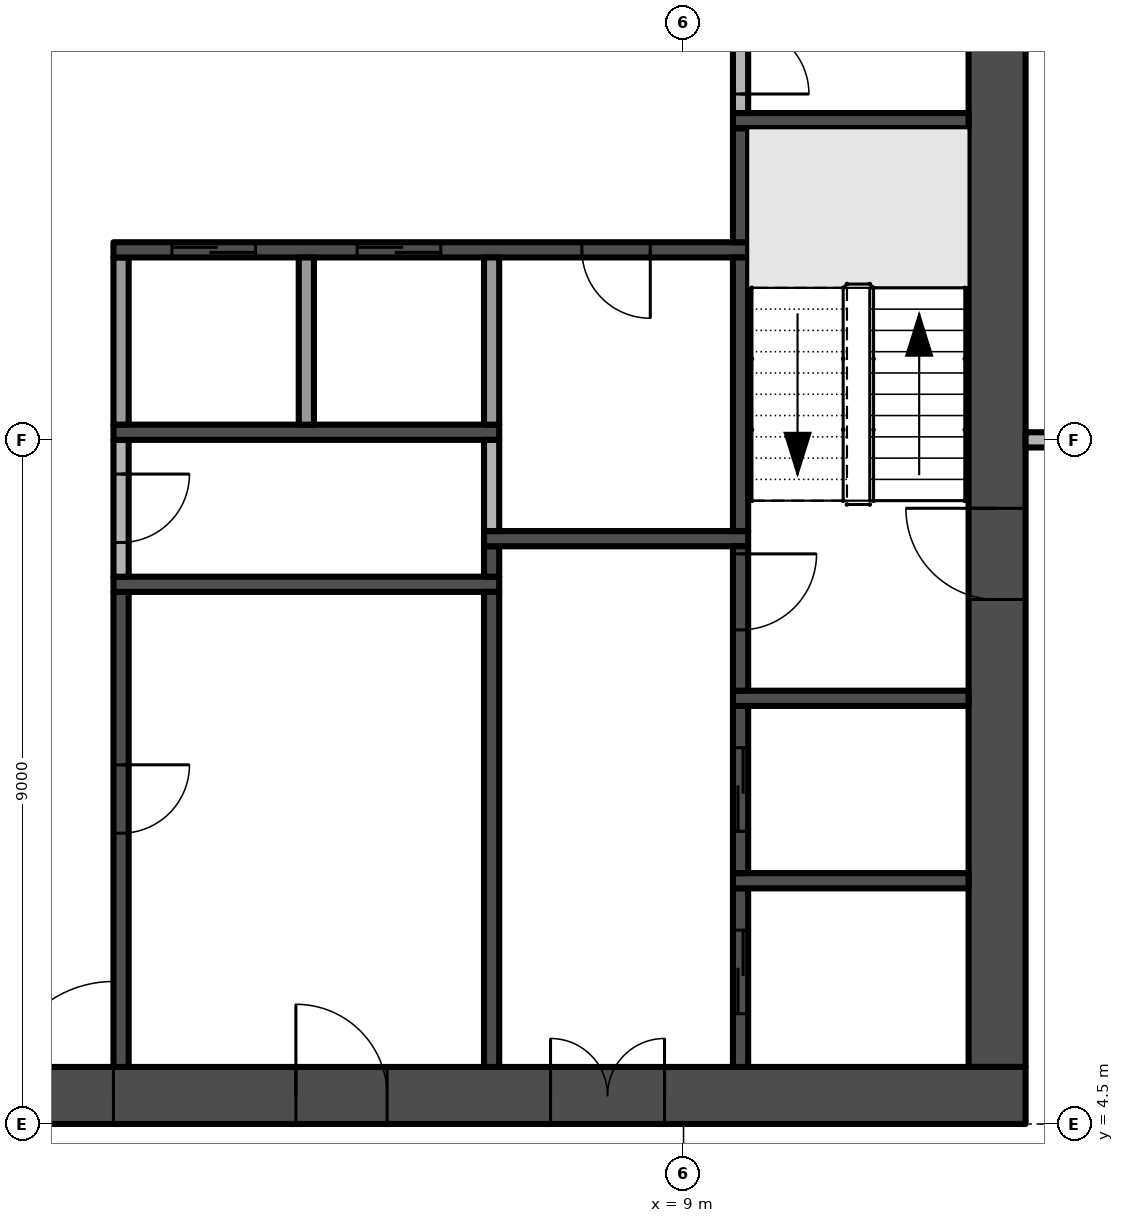
"""IFC4 building model, lengths in metres.
Left out: names, types, materials, properties, quantities, classifications, styles, units other than length and angle.
Written with IfcOpenShell. Run it as: python <this file> out.ifc"""

import sys

from ifc_helpers import new_model, si_unit, direction, frame, frame_2d, origin, place, context, subcontext, project, spatial, rectangle, extrude, element, fill, save


model = new_model("IFC4")
c1 = context("Model", 3, precision=1e-05, world=origin(), true_north=direction((0.0, 1.0)))
c2 = subcontext(c1, "Body", "Model", "MODEL_VIEW")
j1 = project(units=[si_unit("LENGTHUNIT", "METRE"), si_unit("PLANEANGLEUNIT", "RADIAN")], contexts=[c1])
p1 = place(None, origin())
s1 = spatial("IfcSite", under=j1, at=p1, CompositionType="ELEMENT")
p2 = place(p1, origin())
s2 = spatial("IfcBuilding", under=s1, at=p2, CompositionType="ELEMENT")
p3 = place(p2, frame((0.0, 0.0, 125.0)))
s3 = spatial("IfcBuildingStorey", under=s2, at=p3, CompositionType="ELEMENT", Elevation=125.0)
p4 = place(p3, frame((-13.5, 4.875, -0.3), z_axis=(0.0, 0.0, 1.0), x_axis=(1.0, 0.0, 0.0)))
e1 = element("IfcWall", 1, at=p4, inside=s3, PredefinedType="SHEAR", context=c2, shape_type="SweptSolid", body=[
    extrude(rectangle(XDim=27.0, YDim=0.75, at=frame_2d((13.5, 0.0))), origin(), (0.0, 0.0, 1.0), 3.8),
])
p5 = place(p4, frame((12.0, 0.0, 0.3)))
e2 = element("IfcOpeningElement", 2, at=p5, cuts=e1, PredefinedType="OPENING", context=c2, shape_type="SweptSolid", body=[
    extrude(rectangle(XDim=3.0, YDim=2.4, at=frame_2d((1.5, 1.2))), frame((0.0, 0.385, 0.0), z_axis=(0.0, -1.0, 0.0), x_axis=(1.0, 0.0, 0.0)), (0.0, 0.0, 1.0), 0.77),
])
p6 = place(p4, frame((4.9, 0.0, 0.3)))
e3 = element("IfcOpeningElement", 3, at=p6, cuts=e1, PredefinedType="OPENING", context=c2, shape_type="SweptSolid", body=[
    extrude(rectangle(XDim=1.2, YDim=2.2, at=frame_2d((0.6, 1.1))), frame((0.0, 0.385, 0.0), z_axis=(0.0, -1.0, 0.0), x_axis=(1.0, 0.0, 0.0)), (0.0, 0.0, 1.0), 0.77),
])
p7 = place(p4, frame((20.75, 0.0, 0.3)))
e4 = element("IfcOpeningElement", 4, at=p7, cuts=e1, PredefinedType="OPENING", context=c2, shape_type="SweptSolid", body=[
    extrude(rectangle(XDim=1.5, YDim=2.2, at=frame_2d((0.75, 1.1))), frame((0.0, 0.385, 0.0), z_axis=(0.0, -1.0, 0.0), x_axis=(1.0, 0.0, 0.0)), (0.0, 0.0, 1.0), 0.77),
])
p8 = place(p4, frame((17.4, 0.0, 0.3)))
e5 = element("IfcOpeningElement", 5, at=p8, cuts=e1, PredefinedType="OPENING", context=c2, shape_type="SweptSolid", body=[
    extrude(rectangle(XDim=1.2, YDim=2.2, at=frame_2d((0.6, 1.1))), frame((0.0, 0.385, 0.0), z_axis=(0.0, -1.0, 0.0), x_axis=(1.0, 0.0, 0.0)), (0.0, 0.0, 1.0), 0.77),
])
p9 = place(p3, frame((13.125, 5.25, -0.3), z_axis=(0.0, 0.0, 1.0), x_axis=(0.0, 1.0, 0.0)))
e6 = element("IfcWall", 6, at=p9, inside=s3, PredefinedType="SHEAR", context=c2, shape_type="SweptSolid", body=[
    extrude(rectangle(XDim=16.5, YDim=0.75, at=frame_2d((8.25, 0.0))), origin(), (0.0, 0.0, 1.0), 3.8),
])
p10 = place(p9, frame((6.15, 0.0, 0.3)))
e7 = element("IfcOpeningElement", 7, at=p10, cuts=e6, PredefinedType="OPENING", context=c2, shape_type="SweptSolid", body=[
    extrude(rectangle(XDim=1.2, YDim=2.2, at=frame_2d((0.6, 1.1))), frame((0.0, 0.385, 0.0), z_axis=(0.0, -1.0, 0.0), x_axis=(1.0, 0.0, 0.0)), (0.0, 0.0, 1.0), 0.77),
])
p11 = place(p3, frame((1.6, 11.5, 0.0), z_axis=(0.0, 0.0, 1.0), x_axis=(0.0, -1.0, 0.0)))
e8 = element("IfcWall", 8, at=p11, inside=s3, PredefinedType="SHEAR", context=c2, shape_type="SweptSolid", body=[
    extrude(rectangle(XDim=6.25, YDim=0.2, at=frame_2d((3.125, 0.0))), origin(), (0.0, 0.0, 1.0), 3.5),
])
p12 = place(p11, frame((2.275, 0.0, 0.0)))
e9 = element("IfcOpeningElement", 9, at=p12, cuts=e8, PredefinedType="OPENING", context=c2, shape_type="SweptSolid", body=[
    extrude(rectangle(XDim=0.9, YDim=2.1, at=frame_2d((0.45, 1.05))), frame((0.0, 0.11, 0.0), z_axis=(0.0, -1.0, 0.0), x_axis=(1.0, 0.0, 0.0)), (0.0, 0.0, 1.0), 0.22),
])
p13 = place(p3, frame((1.5, 11.6, 0.0), z_axis=(0.0, 0.0, 1.0), x_axis=(1.0, 0.0, 0.0)))
e10 = element("IfcWall", 10, at=p13, inside=s3, PredefinedType="SHEAR", context=c2, shape_type="SweptSolid", body=[
    extrude(rectangle(XDim=5.075, YDim=0.2, at=frame_2d((2.538, 0.0))), origin(), (0.0, 0.0, 1.0), 3.5),
])
p14 = place(p3, frame((1.6, 13.5, 0.0), z_axis=(0.0, 0.0, 1.0), x_axis=(0.0, -1.0, 0.0)))
e11 = element("IfcWall", 11, at=p14, inside=s3, PredefinedType="PARTITIONING", context=c2, shape_type="SweptSolid", body=[
    extrude(rectangle(XDim=1.8, YDim=0.2, at=frame_2d((0.9, 0.0))), origin(), (0.0, 0.0, 1.0), 3.5),
])
p15 = place(p14, frame((0.45, 0.0, 0.0)))
e12 = element("IfcOpeningElement", 12, at=p15, cuts=e11, PredefinedType="OPENING", context=c2, shape_type="SweptSolid", body=[
    extrude(rectangle(XDim=0.9, YDim=2.1, at=frame_2d((0.45, 1.05))), frame((0.0, 0.11, 0.0), z_axis=(0.0, -1.0, 0.0), x_axis=(1.0, 0.0, 0.0)), (0.0, 0.0, 1.0), 0.22),
])
p16 = place(p3, frame((1.5, 13.6, 0.0), z_axis=(0.0, 0.0, 1.0), x_axis=(1.0, 0.0, 0.0)))
e13 = element("IfcWall", 13, at=p16, inside=s3, PredefinedType="SHEAR", context=c2, shape_type="SweptSolid", body=[
    extrude(rectangle(XDim=5.075, YDim=0.2, at=frame_2d((2.538, 0.0))), origin(), (0.0, 0.0, 1.0), 3.5),
])
p17 = place(p3, frame((1.6, 13.7, 0.0), z_axis=(0.0, 0.0, 1.0), x_axis=(0.0, 1.0, 0.0)))
e14 = element("IfcWall", 14, at=p17, inside=s3, PredefinedType="PARTITIONING", context=c2, shape_type="SweptSolid", body=[
    extrude(rectangle(XDim=2.2, YDim=0.2, at=frame_2d((1.1, 0.0))), origin(), (0.0, 0.0, 1.0), 3.5),
])
p18 = place(p3, frame((9.85, 16.0, 0.0), z_axis=(0.0, 0.0, 1.0), x_axis=(-1.0, 0.0, 0.0)))
e15 = element("IfcWall", 15, at=p18, inside=s3, PredefinedType="SHEAR", context=c2, shape_type="SweptSolid", body=[
    extrude(rectangle(XDim=8.35, YDim=0.2, at=frame_2d((4.175, 0.0))), origin(), (0.0, 0.0, 1.0), 3.5),
])
p19 = place(p18, frame((6.481, 0.0, 0.0)))
e16 = element("IfcOpeningElement", 16, at=p19, cuts=e15, PredefinedType="OPENING", context=c2, shape_type="SweptSolid", body=[
    extrude(rectangle(XDim=1.1, YDim=2.1, at=frame_2d((0.55, 1.05))), frame((0.0, 0.11, 0.0), z_axis=(0.0, -1.0, 0.0), x_axis=(1.0, 0.0, 0.0)), (0.0, 0.0, 1.0), 0.22),
])
p20 = place(p18, frame((4.044, 0.0, 0.0)))
e17 = element("IfcOpeningElement", 17, at=p20, cuts=e15, PredefinedType="OPENING", context=c2, shape_type="SweptSolid", body=[
    extrude(rectangle(XDim=1.1, YDim=2.1, at=frame_2d((0.55, 1.05))), frame((0.0, 0.11, 0.0), z_axis=(0.0, -1.0, 0.0), x_axis=(1.0, 0.0, 0.0)), (0.0, 0.0, 1.0), 0.22),
])
p21 = place(p18, frame((1.288, 0.0, 0.0)))
e18 = element("IfcOpeningElement", 18, at=p21, cuts=e15, PredefinedType="OPENING", context=c2, shape_type="SweptSolid", body=[
    extrude(rectangle(XDim=0.9, YDim=2.1, at=frame_2d((0.45, 1.05))), frame((0.0, 0.11, 0.0), z_axis=(0.0, -1.0, 0.0), x_axis=(1.0, 0.0, 0.0)), (0.0, 0.0, 1.0), 0.22),
])
p22 = place(p3, frame((4.037, 13.7, 0.0), z_axis=(0.0, 0.0, 1.0), x_axis=(0.0, 1.0, 0.0)))
e19 = element("IfcWall", 19, at=p22, inside=s3, PredefinedType="PARTITIONING", context=c2, shape_type="SweptSolid", body=[
    extrude(rectangle(XDim=2.2, YDim=0.2, at=frame_2d((1.1, 0.0))), origin(), (0.0, 0.0, 1.0), 3.5),
])
p23 = place(p3, frame((6.475, 5.25, 0.0), z_axis=(0.0, 0.0, 1.0), x_axis=(0.0, 1.0, 0.0)))
e20 = element("IfcWall", 20, at=p23, inside=s3, PredefinedType="SHEAR", context=c2, shape_type="SweptSolid", body=[
    extrude(rectangle(XDim=6.25, YDim=0.2, at=frame_2d((3.125, 0.0))), origin(), (0.0, 0.0, 1.0), 3.5),
])
p24 = place(p3, frame((6.475, 11.7, 0.0), z_axis=(0.0, 0.0, 1.0), x_axis=(0.0, 1.0, 0.0)))
e21 = element("IfcWall", 21, at=p24, inside=s3, PredefinedType="SHEAR", context=c2, shape_type="SweptSolid", body=[
    extrude(rectangle(XDim=0.4, YDim=0.2, at=frame_2d((0.2, 0.0))), origin(), (0.0, 0.0, 1.0), 3.5),
])
p25 = place(p3, frame((6.375, 12.2, 0.0), z_axis=(0.0, 0.0, 1.0), x_axis=(1.0, 0.0, 0.0)))
e22 = element("IfcWall", 22, at=p25, inside=s3, PredefinedType="SHEAR", context=c2, shape_type="SweptSolid", body=[
    extrude(rectangle(XDim=3.475, YDim=0.2, at=frame_2d((1.738, 0.0))), origin(), (0.0, 0.0, 1.0), 3.5),
])
p26 = place(p3, frame((6.475, 12.3, 0.0), z_axis=(0.0, 0.0, 1.0), x_axis=(0.0, 1.0, 0.0)))
e23 = element("IfcWall", 23, at=p26, inside=s3, PredefinedType="PARTITIONING", context=c2, shape_type="SweptSolid", body=[
    extrude(rectangle(XDim=1.2, YDim=0.2, at=frame_2d((0.6, 0.0))), origin(), (0.0, 0.0, 1.0), 3.5),
])
p27 = place(p3, frame((6.475, 13.7, 0.0), z_axis=(0.0, 0.0, 1.0), x_axis=(0.0, 1.0, 0.0)))
e24 = element("IfcWall", 24, at=p27, inside=s3, PredefinedType="PARTITIONING", context=c2, shape_type="SweptSolid", body=[
    extrude(rectangle(XDim=2.2, YDim=0.2, at=frame_2d((1.1, 0.0))), origin(), (0.0, 0.0, 1.0), 3.5),
])
p28 = place(p3, frame((9.75, 5.25, 0.0), z_axis=(0.0, 0.0, 1.0), x_axis=(0.0, 1.0, 0.0)))
e25 = element("IfcWall", 25, at=p28, inside=s3, PredefinedType="SHEAR", context=c2, shape_type="SweptSolid", body=[
    extrude(rectangle(XDim=2.35, YDim=0.2, at=frame_2d((1.175, 0.0))), origin(), (0.0, 0.0, 1.0), 3.5),
])
p29 = place(p28, frame((0.7, 0.0, 0.0)))
e26 = element("IfcOpeningElement", 26, at=p29, cuts=e25, PredefinedType="OPENING", context=c2, shape_type="SweptSolid", body=[
    extrude(rectangle(XDim=1.1, YDim=2.1, at=frame_2d((0.55, 1.05))), frame((0.0, 0.11, 0.0), z_axis=(0.0, -1.0, 0.0), x_axis=(1.0, 0.0, 0.0)), (0.0, 0.0, 1.0), 0.22),
])
p30 = place(p3, frame((9.65, 7.7, 0.0), z_axis=(0.0, 0.0, 1.0), x_axis=(1.0, 0.0, 0.0)))
e27 = element("IfcWall", 27, at=p30, inside=s3, PredefinedType="SHEAR", context=c2, shape_type="SweptSolid", body=[
    extrude(rectangle(XDim=3.1, YDim=0.2, at=frame_2d((1.55, 0.0))), origin(), (0.0, 0.0, 1.0), 3.5),
])
p31 = place(p3, frame((9.75, 7.8, 0.0), z_axis=(0.0, 0.0, 1.0), x_axis=(0.0, 1.0, 0.0)))
e28 = element("IfcWall", 28, at=p31, inside=s3, PredefinedType="SHEAR", context=c2, shape_type="SweptSolid", body=[
    extrude(rectangle(XDim=2.2, YDim=0.2, at=frame_2d((1.1, 0.0))), origin(), (0.0, 0.0, 1.0), 3.5),
])
p32 = place(p31, frame((0.55, 0.0, 0.0)))
e29 = element("IfcOpeningElement", 29, at=p32, cuts=e28, PredefinedType="OPENING", context=c2, shape_type="SweptSolid", body=[
    extrude(rectangle(XDim=1.1, YDim=2.1, at=frame_2d((0.55, 1.05))), frame((0.0, 0.11, 0.0), z_axis=(0.0, -1.0, 0.0), x_axis=(1.0, 0.0, 0.0)), (0.0, 0.0, 1.0), 0.22),
])
p33 = place(p3, frame((9.65, 10.1, 0.0), z_axis=(0.0, 0.0, 1.0), x_axis=(1.0, 0.0, 0.0)))
e30 = element("IfcWall", 30, at=p33, inside=s3, PredefinedType="SHEAR", context=c2, shape_type="SweptSolid", body=[
    extrude(rectangle(XDim=3.1, YDim=0.2, at=frame_2d((1.55, 0.0))), origin(), (0.0, 0.0, 1.0), 3.5),
])
p34 = place(p3, frame((9.75, 12.1, 0.0), z_axis=(0.0, 0.0, 1.0), x_axis=(0.0, -1.0, 0.0)))
e31 = element("IfcWall", 31, at=p34, inside=s3, PredefinedType="SHEAR", context=c2, shape_type="SweptSolid", body=[
    extrude(rectangle(XDim=1.9, YDim=0.2, at=frame_2d((0.95, 0.0))), origin(), (0.0, 0.0, 1.0), 3.5),
])
p35 = place(p34, frame((0.1, 0.0, 0.0)))
e32 = element("IfcOpeningElement", 32, at=p35, cuts=e31, PredefinedType="OPENING", context=c2, shape_type="SweptSolid", body=[
    extrude(rectangle(XDim=1.0, YDim=2.2, at=frame_2d((0.5, 1.1))), frame((0.0, 0.11, 0.0), z_axis=(0.0, -1.0, 0.0), x_axis=(1.0, 0.0, 0.0)), (0.0, 0.0, 1.0), 0.22),
])
p36 = place(p3, frame((9.75, 12.3, 0.0), z_axis=(0.0, 0.0, 1.0), x_axis=(0.0, 1.0, 0.0)))
e33 = element("IfcWall", 33, at=p36, inside=s3, PredefinedType="SHEAR", context=c2, shape_type="SweptSolid", body=[
    extrude(rectangle(XDim=3.6, YDim=0.2, at=frame_2d((1.8, 0.0))), origin(), (0.0, 0.0, 1.0), 3.5),
])
p37 = place(p3, frame((9.75, 16.1, 0.0), z_axis=(0.0, 0.0, 1.0), x_axis=(0.0, 1.0, 0.0)))
e34 = element("IfcWall", 34, at=p37, inside=s3, PredefinedType="SHEAR", context=c2, shape_type="SweptSolid", body=[
    extrude(rectangle(XDim=1.5, YDim=0.2, at=frame_2d((0.75, 0.0))), origin(), (0.0, 0.0, 1.0), 3.5),
])
p38 = place(p3, frame((9.65, 17.7, 0.0), z_axis=(0.0, 0.0, 1.0), x_axis=(1.0, 0.0, 0.0)))
e35 = element("IfcWall", 35, at=p38, inside=s3, PredefinedType="SHEAR", context=c2, shape_type="SweptSolid", body=[
    extrude(rectangle(XDim=3.1, YDim=0.2, at=frame_2d((1.55, 0.0))), origin(), (0.0, 0.0, 1.0), 3.5),
])
p39 = place(p3, frame((9.75, 19.2, 0.0), z_axis=(0.0, 0.0, 1.0), x_axis=(0.0, -1.0, 0.0)))
e36 = element("IfcWall", 36, at=p39, inside=s3, PredefinedType="PARTITIONING", context=c2, shape_type="SweptSolid", body=[
    extrude(rectangle(XDim=1.4, YDim=0.2, at=frame_2d((0.7, 0.0))), origin(), (0.0, 0.0, 1.0), 3.5),
])
p40 = place(p39, frame((0.25, 0.0, 0.0)))
e37 = element("IfcOpeningElement", 37, at=p40, cuts=e36, PredefinedType="OPENING", context=c2, shape_type="SweptSolid", body=[
    extrude(rectangle(XDim=0.9, YDim=2.1, at=frame_2d((0.45, 1.05))), frame((0.0, 0.11, 0.0), z_axis=(0.0, -1.0, 0.0), x_axis=(1.0, 0.0, 0.0)), (0.0, 0.0, 1.0), 0.22),
])
p41 = place(p3, frame((13.5, 13.5, 0.0), z_axis=(0.0, 0.0, 1.0), x_axis=(1.0, 0.0, 0.0)))
e38 = element("IfcWall", 38, at=p41, inside=s3, PredefinedType="PARTITIONING", context=c2, shape_type="SweptSolid", body=[
    extrude(rectangle(XDim=3.85, YDim=0.2, at=frame_2d((1.925, 0.0))), origin(), (0.0, 0.0, 1.0), 3.5),
])
p42 = place(p41, frame((1.6, 0.0, 0.0)))
e39 = element("IfcOpeningElement", 39, at=p42, cuts=e38, PredefinedType="OPENING", context=c2, shape_type="SweptSolid", body=[
    extrude(rectangle(XDim=0.9, YDim=2.1, at=frame_2d((0.45, 1.05))), frame((0.0, 0.11, 0.0), z_axis=(0.0, -1.0, 0.0), x_axis=(1.0, 0.0, 0.0)), (0.0, 0.0, 1.0), 0.22),
])
p43 = place(p5, frame((3.0, 0.0, 0.0), z_axis=(0.0, 0.0, 1.0), x_axis=(-1.0, 0.0, 0.0)))
e40 = element("IfcDoor", 40, at=p43, inside=s3, OperationType="DOUBLE_DOOR_SINGLE_SWING", PredefinedType="DOOR", context=c2, shape_type="SweptSolid", body=[
    extrude(rectangle(XDim=3.0, YDim=2.4, at=frame_2d((1.5, 1.2))), frame((0.0, 0.025, 0.0), z_axis=(0.0, -1.0, 0.0), x_axis=(1.0, 0.0, 0.0)), (0.0, 0.0, 1.0), 0.05),
])
fill(e2, e40)
p44 = place(p10, frame((1.2, 0.0, 0.0), z_axis=(0.0, 0.0, 1.0), x_axis=(-1.0, 0.0, 0.0)))
e41 = element("IfcDoor", 41, at=p44, inside=s3, OperationType="SINGLE_SWING_LEFT", PredefinedType="DOOR", context=c2, shape_type="SweptSolid", body=[
    extrude(rectangle(XDim=1.2, YDim=2.2, at=frame_2d((0.6, 1.1))), frame((0.0, 0.025, 0.0), z_axis=(0.0, -1.0, 0.0), x_axis=(1.0, 0.0, 0.0)), (0.0, 0.0, 1.0), 0.05),
])
fill(e7, e41)
p45 = place(p7, frame((1.5, 0.0, 0.0), z_axis=(0.0, 0.0, 1.0), x_axis=(-1.0, 0.0, 0.0)))
e42 = element("IfcDoor", 42, at=p45, inside=s3, OperationType="DOUBLE_DOOR_SINGLE_SWING", PredefinedType="DOOR", context=c2, shape_type="SweptSolid", body=[
    extrude(rectangle(XDim=1.5, YDim=2.2, at=frame_2d((0.75, 1.1))), frame((0.0, 0.025, 0.0), z_axis=(0.0, -1.0, 0.0), x_axis=(1.0, 0.0, 0.0)), (0.0, 0.0, 1.0), 0.05),
])
fill(e4, e42)
p46 = place(p8, frame((1.2, 0.0, 0.0), z_axis=(0.0, 0.0, 1.0), x_axis=(-1.0, 0.0, 0.0)))
e43 = element("IfcDoor", 43, at=p46, inside=s3, OperationType="SINGLE_SWING_RIGHT", PredefinedType="DOOR", context=c2, shape_type="SweptSolid", body=[
    extrude(rectangle(XDim=1.2, YDim=2.2, at=frame_2d((0.6, 1.1))), frame((0.0, 0.025, 0.0), z_axis=(0.0, -1.0, 0.0), x_axis=(1.0, 0.0, 0.0)), (0.0, 0.0, 1.0), 0.05),
])
fill(e5, e43)
p47 = place(p35, origin())
e44 = element("IfcDoor", 44, at=p47, inside=s3, OperationType="SINGLE_SWING_LEFT", PredefinedType="DOOR", context=c2, shape_type="SweptSolid", body=[
    extrude(rectangle(XDim=1.0, YDim=2.2, at=frame_2d((0.5, 1.1))), frame((0.0, 0.025, 0.0), z_axis=(0.0, -1.0, 0.0), x_axis=(1.0, 0.0, 0.0)), (0.0, 0.0, 1.0), 0.05),
])
fill(e32, e44)
p48 = place(p19, origin())
e45 = element("IfcDoor", 45, at=p48, inside=s3, OperationType="SLIDING_TO_RIGHT", PredefinedType="DOOR", context=c2, shape_type="SweptSolid", body=[
    extrude(rectangle(XDim=1.1, YDim=2.1, at=frame_2d((0.55, 1.05))), frame((0.0, 0.025, 0.0), z_axis=(0.0, -1.0, 0.0), x_axis=(1.0, 0.0, 0.0)), (0.0, 0.0, 1.0), 0.05),
])
fill(e16, e45)
p49 = place(p20, origin())
e46 = element("IfcDoor", 46, at=p49, inside=s3, OperationType="SLIDING_TO_RIGHT", PredefinedType="DOOR", context=c2, shape_type="SweptSolid", body=[
    extrude(rectangle(XDim=1.1, YDim=2.1, at=frame_2d((0.55, 1.05))), frame((0.0, 0.025, 0.0), z_axis=(0.0, -1.0, 0.0), x_axis=(1.0, 0.0, 0.0)), (0.0, 0.0, 1.0), 0.05),
])
fill(e17, e46)
p50 = place(p29, origin())
e47 = element("IfcDoor", 47, at=p50, inside=s3, OperationType="SLIDING_TO_RIGHT", PredefinedType="DOOR", context=c2, shape_type="SweptSolid", body=[
    extrude(rectangle(XDim=1.1, YDim=2.1, at=frame_2d((0.55, 1.05))), frame((0.0, 0.025, 0.0), z_axis=(0.0, -1.0, 0.0), x_axis=(1.0, 0.0, 0.0)), (0.0, 0.0, 1.0), 0.05),
])
fill(e26, e47)
p51 = place(p32, origin())
e48 = element("IfcDoor", 48, at=p51, inside=s3, OperationType="SLIDING_TO_RIGHT", PredefinedType="DOOR", context=c2, shape_type="SweptSolid", body=[
    extrude(rectangle(XDim=1.1, YDim=2.1, at=frame_2d((0.55, 1.05))), frame((0.0, 0.025, 0.0), z_axis=(0.0, -1.0, 0.0), x_axis=(1.0, 0.0, 0.0)), (0.0, 0.0, 1.0), 0.05),
])
fill(e29, e48)
p52 = place(p12, origin())
e49 = element("IfcDoor", 49, at=p52, inside=s3, OperationType="SINGLE_SWING_LEFT", PredefinedType="DOOR", context=c2, shape_type="SweptSolid", body=[
    extrude(rectangle(XDim=0.9, YDim=2.1, at=frame_2d((0.45, 1.05))), frame((0.0, 0.025, 0.0), z_axis=(0.0, -1.0, 0.0), x_axis=(1.0, 0.0, 0.0)), (0.0, 0.0, 1.0), 0.05),
])
fill(e9, e49)
p53 = place(p15, origin())
e50 = element("IfcDoor", 50, at=p53, inside=s3, OperationType="SINGLE_SWING_LEFT", PredefinedType="DOOR", context=c2, shape_type="SweptSolid", body=[
    extrude(rectangle(XDim=0.9, YDim=2.1, at=frame_2d((0.45, 1.05))), frame((0.0, 0.025, 0.0), z_axis=(0.0, -1.0, 0.0), x_axis=(1.0, 0.0, 0.0)), (0.0, 0.0, 1.0), 0.05),
])
fill(e12, e50)
p54 = place(p21, origin())
e51 = element("IfcDoor", 51, at=p54, inside=s3, OperationType="SINGLE_SWING_LEFT", PredefinedType="DOOR", context=c2, shape_type="SweptSolid", body=[
    extrude(rectangle(XDim=0.9, YDim=2.1, at=frame_2d((0.45, 1.05))), frame((0.0, 0.025, 0.0), z_axis=(0.0, -1.0, 0.0), x_axis=(1.0, 0.0, 0.0)), (0.0, 0.0, 1.0), 0.05),
])
fill(e18, e51)
p55 = place(p40, origin())
e52 = element("IfcDoor", 52, at=p55, inside=s3, OperationType="SINGLE_SWING_RIGHT", PredefinedType="DOOR", context=c2, shape_type="SweptSolid", body=[
    extrude(rectangle(XDim=0.9, YDim=2.1, at=frame_2d((0.45, 1.05))), frame((0.0, 0.025, 0.0), z_axis=(0.0, -1.0, 0.0), x_axis=(1.0, 0.0, 0.0)), (0.0, 0.0, 1.0), 0.05),
])
fill(e37, e52)
save(model, sys.argv[1])
